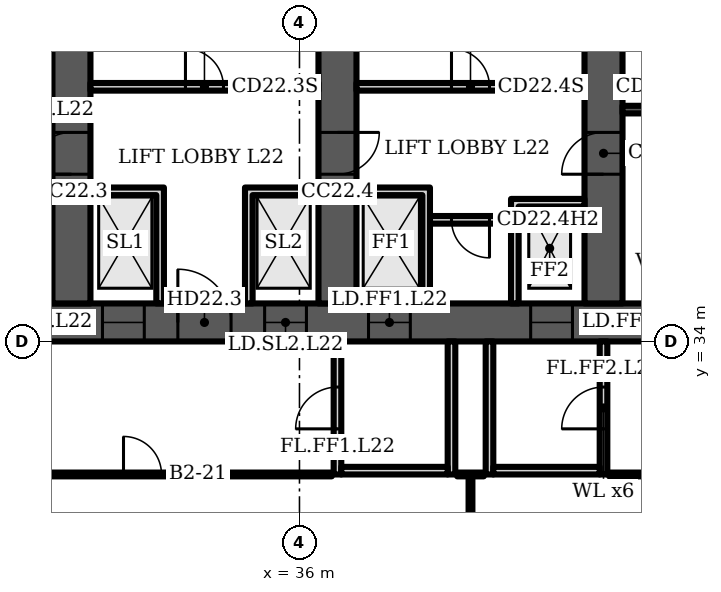
"""IFC4 building model, lengths in metres.
Left out: names, types, materials, properties, quantities, classifications, styles, units other than length and angle.
Written with IfcOpenShell. Run it as: python <this file> out.ifc"""

import sys

from ifc_helpers import new_model, si_unit, direction, frame, frame_2d, origin, place, context, subcontext, project, spatial, polyline, rectangle, outline, extrude, element, fill, save


model = new_model("IFC4")
c1 = context("Model", 3, precision=1e-05, world=origin(), true_north=direction((0.0, 1.0)))
c2 = subcontext(c1, "Body", "Model", "MODEL_VIEW")
j1 = project(units=[si_unit("LENGTHUNIT", "METRE"), si_unit("PLANEANGLEUNIT", "RADIAN")], contexts=[c1])
p1 = place(None, origin())
s1 = spatial("IfcSite", under=j1, at=p1, CompositionType="ELEMENT")
p2 = place(p1, origin())
s2 = spatial("IfcBuilding", under=s1, at=p2, CompositionType="ELEMENT")
p3 = place(p2, frame((0.0, 0.0, 100.3)))
s3 = spatial("IfcBuildingStorey", under=s2, at=p3, CompositionType="ELEMENT", Elevation=100.3)
p4 = place(p3, frame((16.0, 34.5, 0.0), z_axis=(0.0, 0.0, 1.0), x_axis=(1.0, 0.0, 0.0)))
e1 = element("IfcWall", 1, at=p4, inside=s3, PredefinedType="SHEAR", context=c2, shape_type="SweptSolid", body=[
    extrude(rectangle(XDim=49.0, YDim=1.0, at=frame_2d((24.5, 0.0))), origin(), (0.0, 0.0, 1.0), 3.6),
])
p5 = place(p4, frame((1.2, 0.0, 0.0)))
e2 = element("IfcOpeningElement", 2, at=p5, cuts=e1, PredefinedType="OPENING", context=c2, shape_type="SweptSolid", body=[
    extrude(rectangle(XDim=1.1, YDim=2.1, at=frame_2d((0.55, 1.05))), frame((0.0, 0.51, 0.0), z_axis=(0.0, -1.0, 0.0), x_axis=(1.0, 0.0, 0.0)), (0.0, 0.0, 1.0), 1.02),
])
p6 = place(p4, frame((5.083, 0.0, 0.0)))
e3 = element("IfcOpeningElement", 3, at=p6, cuts=e1, PredefinedType="OPENING", context=c2, shape_type="SweptSolid", body=[
    extrude(rectangle(XDim=1.1, YDim=2.1, at=frame_2d((0.55, 1.05))), frame((0.0, 0.51, 0.0), z_axis=(0.0, -1.0, 0.0), x_axis=(1.0, 0.0, 0.0)), (0.0, 0.0, 1.0), 1.02),
])
p7 = place(p4, frame((2.933, 0.0, 0.0)))
e4 = element("IfcOpeningElement", 4, at=p7, cuts=e1, PredefinedType="OPENING", context=c2, shape_type="SweptSolid", body=[
    extrude(rectangle(XDim=1.4, YDim=2.1, at=frame_2d((0.7, 1.05))), frame((0.0, 0.51, 0.0), z_axis=(0.0, -1.0, 0.0), x_axis=(1.0, 0.0, 0.0)), (0.0, 0.0, 1.0), 1.02),
])
p8 = place(p4, frame((7.65, 0.0, 0.0)))
e5 = element("IfcOpeningElement", 5, at=p8, cuts=e1, PredefinedType="OPENING", context=c2, shape_type="SweptSolid", body=[
    extrude(rectangle(XDim=1.2, YDim=2.1, at=frame_2d((0.6, 1.05))), frame((0.0, 0.51, 0.0), z_axis=(0.0, -1.0, 0.0), x_axis=(1.0, 0.0, 0.0)), (0.0, 0.0, 1.0), 1.02),
])
p9 = place(p4, frame((14.817, 0.0, 0.0)))
e6 = element("IfcOpeningElement", 6, at=p9, cuts=e1, PredefinedType="OPENING", context=c2, shape_type="SweptSolid", body=[
    extrude(rectangle(XDim=1.1, YDim=2.1, at=frame_2d((0.55, 1.05))), frame((0.0, 0.51, 0.0), z_axis=(0.0, -1.0, 0.0), x_axis=(1.0, 0.0, 0.0)), (0.0, 0.0, 1.0), 1.02),
])
p10 = place(p4, frame((19.083, 0.0, 0.0)))
e7 = element("IfcOpeningElement", 7, at=p10, cuts=e1, PredefinedType="OPENING", context=c2, shape_type="SweptSolid", body=[
    extrude(rectangle(XDim=1.1, YDim=2.1, at=frame_2d((0.55, 1.05))), frame((0.0, 0.51, 0.0), z_axis=(0.0, -1.0, 0.0), x_axis=(1.0, 0.0, 0.0)), (0.0, 0.0, 1.0), 1.02),
])
p11 = place(p4, frame((16.8, 0.0, 0.0)))
e8 = element("IfcOpeningElement", 8, at=p11, cuts=e1, PredefinedType="OPENING", context=c2, shape_type="SweptSolid", body=[
    extrude(rectangle(XDim=1.4, YDim=2.1, at=frame_2d((0.7, 1.05))), frame((0.0, 0.51, 0.0), z_axis=(0.0, -1.0, 0.0), x_axis=(1.0, 0.0, 0.0)), (0.0, 0.0, 1.0), 1.02),
])
p12 = place(p4, frame((21.817, 0.0, 0.0)))
e9 = element("IfcOpeningElement", 9, at=p12, cuts=e1, PredefinedType="OPENING", context=c2, shape_type="SweptSolid", body=[
    extrude(rectangle(XDim=1.1, YDim=2.1, at=frame_2d((0.55, 1.05))), frame((0.0, 0.51, 0.0), z_axis=(0.0, -1.0, 0.0), x_axis=(1.0, 0.0, 0.0)), (0.0, 0.0, 1.0), 1.02),
])
p13 = place(p4, frame((26.083, 0.0, 0.0)))
e10 = element("IfcOpeningElement", 10, at=p13, cuts=e1, PredefinedType="OPENING", context=c2, shape_type="SweptSolid", body=[
    extrude(rectangle(XDim=1.1, YDim=2.1, at=frame_2d((0.55, 1.05))), frame((0.0, 0.51, 0.0), z_axis=(0.0, -1.0, 0.0), x_axis=(1.0, 0.0, 0.0)), (0.0, 0.0, 1.0), 1.02),
])
p14 = place(p4, frame((33.15, 0.0, 0.0)))
e11 = element("IfcOpeningElement", 11, at=p14, cuts=e1, PredefinedType="OPENING", context=c2, shape_type="SweptSolid", body=[
    extrude(rectangle(XDim=1.2, YDim=2.1, at=frame_2d((0.6, 1.05))), frame((0.0, 0.51, 0.0), z_axis=(0.0, -1.0, 0.0), x_axis=(1.0, 0.0, 0.0)), (0.0, 0.0, 1.0), 1.02),
])
p15 = place(p4, frame((37.8, 0.0, 0.0)))
e12 = element("IfcOpeningElement", 12, at=p15, cuts=e1, PredefinedType="OPENING", context=c2, shape_type="SweptSolid", body=[
    extrude(rectangle(XDim=1.4, YDim=2.1, at=frame_2d((0.7, 1.05))), frame((0.0, 0.51, 0.0), z_axis=(0.0, -1.0, 0.0), x_axis=(1.0, 0.0, 0.0)), (0.0, 0.0, 1.0), 1.02),
])
p16 = place(p4, frame((42.817, 0.0, 0.0)))
e13 = element("IfcOpeningElement", 13, at=p16, cuts=e1, PredefinedType="OPENING", context=c2, shape_type="SweptSolid", body=[
    extrude(rectangle(XDim=1.1, YDim=2.1, at=frame_2d((0.55, 1.05))), frame((0.0, 0.51, 0.0), z_axis=(0.0, -1.0, 0.0), x_axis=(1.0, 0.0, 0.0)), (0.0, 0.0, 1.0), 1.02),
])
p17 = place(p4, frame((46.7, 0.0, 0.0)))
e14 = element("IfcOpeningElement", 14, at=p17, cuts=e1, PredefinedType="OPENING", context=c2, shape_type="SweptSolid", body=[
    extrude(rectangle(XDim=1.1, YDim=2.1, at=frame_2d((0.55, 1.05))), frame((0.0, 0.51, 0.0), z_axis=(0.0, -1.0, 0.0), x_axis=(1.0, 0.0, 0.0)), (0.0, 0.0, 1.0), 1.02),
])
p18 = place(p4, frame((44.667, 0.0, 0.0)))
e15 = element("IfcOpeningElement", 15, at=p18, cuts=e1, PredefinedType="OPENING", context=c2, shape_type="SweptSolid", body=[
    extrude(rectangle(XDim=1.4, YDim=2.1, at=frame_2d((0.7, 1.05))), frame((0.0, 0.51, 0.0), z_axis=(0.0, -1.0, 0.0), x_axis=(1.0, 0.0, 0.0)), (0.0, 0.0, 1.0), 1.02),
])
p19 = place(p3, frame((30.0, 35.0, 0.0), z_axis=(0.0, 0.0, 1.0), x_axis=(0.0, 1.0, 0.0)))
e16 = element("IfcWall", 16, at=p19, inside=s3, PredefinedType="SHEAR", context=c2, shape_type="SweptSolid", body=[
    extrude(rectangle(XDim=13.965, YDim=1.0, at=frame_2d((6.982, 0.0))), origin(), (0.0, 0.0, 1.0), 3.6),
])
p20 = place(p19, frame((3.4, 0.0, 0.0)))
e17 = element("IfcOpeningElement", 17, at=p20, cuts=e16, PredefinedType="OPENING", context=c2, shape_type="SweptSolid", body=[
    extrude(rectangle(XDim=1.1, YDim=2.1, at=frame_2d((0.55, 1.05))), frame((0.0, 0.51, 0.0), z_axis=(0.0, -1.0, 0.0), x_axis=(1.0, 0.0, 0.0)), (0.0, 0.0, 1.0), 1.02),
])
p21 = place(p3, frame((37.0, 35.0, 0.0), z_axis=(0.0, 0.0, 1.0), x_axis=(0.0, 1.0, 0.0)))
e18 = element("IfcWall", 18, at=p21, inside=s3, PredefinedType="SHEAR", context=c2, shape_type="SweptSolid", body=[
    extrude(rectangle(XDim=14.577, YDim=1.0, at=frame_2d((7.289, 0.0))), origin(), (0.0, 0.0, 1.0), 3.6),
])
p22 = place(p21, frame((3.4, 0.0, 0.0)))
e19 = element("IfcOpeningElement", 19, at=p22, cuts=e18, PredefinedType="OPENING", context=c2, shape_type="SweptSolid", body=[
    extrude(rectangle(XDim=1.1, YDim=2.1, at=frame_2d((0.55, 1.05))), frame((0.0, 0.51, 0.0), z_axis=(0.0, -1.0, 0.0), x_axis=(1.0, 0.0, 0.0)), (0.0, 0.0, 1.0), 1.02),
])
p23 = place(p21, frame((9.8, 0.0, 0.0)))
e20 = element("IfcOpeningElement", 20, at=p23, cuts=e18, PredefinedType="OPENING", context=c2, shape_type="SweptSolid", body=[
    extrude(rectangle(XDim=1.0, YDim=2.1, at=frame_2d((0.5, 1.05))), frame((0.0, 0.51, 0.0), z_axis=(0.0, -1.0, 0.0), x_axis=(1.0, 0.0, 0.0)), (0.0, 0.0, 1.0), 1.02),
])
p24 = place(p3, frame((44.0, 35.0, 0.0), z_axis=(0.0, 0.0, 1.0), x_axis=(0.0, 1.0, 0.0)))
e21 = element("IfcWall", 21, at=p24, inside=s3, PredefinedType="SHEAR", context=c2, shape_type="SweptSolid", body=[
    extrude(rectangle(XDim=14.577, YDim=1.0, at=frame_2d((7.289, 0.0))), origin(), (0.0, 0.0, 1.0), 3.6),
])
p25 = place(p24, frame((3.4, 0.0, 0.0)))
e22 = element("IfcOpeningElement", 22, at=p25, cuts=e21, PredefinedType="OPENING", context=c2, shape_type="SweptSolid", body=[
    extrude(rectangle(XDim=1.1, YDim=2.1, at=frame_2d((0.55, 1.05))), frame((0.0, 0.51, 0.0), z_axis=(0.0, -1.0, 0.0), x_axis=(1.0, 0.0, 0.0)), (0.0, 0.0, 1.0), 1.02),
])
p26 = place(p24, frame((9.8, 0.0, 0.0)))
e23 = element("IfcOpeningElement", 23, at=p26, cuts=e21, PredefinedType="OPENING", context=c2, shape_type="SweptSolid", body=[
    extrude(rectangle(XDim=1.0, YDim=2.1, at=frame_2d((0.5, 1.05))), frame((0.0, 0.51, 0.0), z_axis=(0.0, -1.0, 0.0), x_axis=(1.0, 0.0, 0.0)), (0.0, 0.0, 1.0), 1.02),
])
p27 = place(p3, frame((30.5, 40.7, 0.0), z_axis=(0.0, 0.0, 1.0), x_axis=(1.0, 0.0, 0.0)))
e24 = element("IfcWall", 24, at=p27, inside=s3, PredefinedType="PARTITIONING", context=c2, shape_type="SweptSolid", body=[
    extrude(rectangle(XDim=6.0, YDim=0.2, at=frame_2d((3.0, 0.0))), origin(), (0.0, 0.0, 1.0), 3.2),
])
p28 = place(p27, frame((2.5, 0.0, 0.0)))
e25 = element("IfcOpeningElement", 25, at=p28, cuts=e24, PredefinedType="OPENING", context=c2, shape_type="SweptSolid", body=[
    extrude(rectangle(XDim=1.0, YDim=2.1, at=frame_2d((0.5, 1.05))), frame((0.0, 0.11, 0.0), z_axis=(0.0, -1.0, 0.0), x_axis=(1.0, 0.0, 0.0)), (0.0, 0.0, 1.0), 0.22),
])
p29 = place(p3, frame((0.0, 0.0, -0.0)))
e26 = element("IfcWall", 26, at=p29, inside=s3, PredefinedType="PARTITIONING", context=c2, shape_type="SweptSolid", body=[
    extrude(outline(polyline([(32.233, 37.85), (30.5, 37.85), (30.5, 38.05), (32.233, 38.05), (32.433, 38.05), (32.433, 35.0), (32.233, 35.0), (32.233, 37.85)])), origin(), (0.0, 0.0, 1.0), 3.2),
])
p30 = place(p3, frame((0.0, 0.0, -0.0)))
e27 = element("IfcWall", 27, at=p30, inside=s3, PredefinedType="PARTITIONING", context=c2, shape_type="SweptSolid", body=[
    extrude(outline(polyline([(34.567, 38.05), (34.767, 38.05), (36.5, 38.05), (36.5, 37.85), (34.767, 37.85), (34.767, 35.0), (34.567, 35.0), (34.567, 38.05)])), origin(), (0.0, 0.0, 1.0), 3.2),
])
p31 = place(p3, frame((39.433, 37.2, 0.0), z_axis=(0.0, 0.0, 1.0), x_axis=(1.0, 0.0, 0.0)))
e28 = element("IfcWall", 28, at=p31, inside=s3, PredefinedType="PARTITIONING", context=c2, shape_type="SweptSolid", body=[
    extrude(rectangle(XDim=2.133, YDim=0.2, at=frame_2d((1.067, 0.0))), origin(), (0.0, 0.0, 1.0), 3.2),
])
p32 = place(p31, frame((0.567, 0.0, 0.0)))
e29 = element("IfcOpeningElement", 29, at=p32, cuts=e28, PredefinedType="OPENING", context=c2, shape_type="SweptSolid", body=[
    extrude(rectangle(XDim=1.0, YDim=2.1, at=frame_2d((0.5, 1.05))), frame((0.0, 0.11, 0.0), z_axis=(0.0, -1.0, 0.0), x_axis=(1.0, 0.0, 0.0)), (0.0, 0.0, 1.0), 0.22),
])
p33 = place(p3, frame((37.5, 40.7, 0.0), z_axis=(0.0, 0.0, 1.0), x_axis=(1.0, 0.0, 0.0)))
e30 = element("IfcWall", 30, at=p33, inside=s3, PredefinedType="PARTITIONING", context=c2, shape_type="SweptSolid", body=[
    extrude(rectangle(XDim=6.0, YDim=0.2, at=frame_2d((3.0, 0.0))), origin(), (0.0, 0.0, 1.0), 3.2),
])
p34 = place(p33, frame((2.5, 0.0, 0.0)))
e31 = element("IfcOpeningElement", 31, at=p34, cuts=e30, PredefinedType="OPENING", context=c2, shape_type="SweptSolid", body=[
    extrude(rectangle(XDim=1.0, YDim=2.1, at=frame_2d((0.5, 1.05))), frame((0.0, 0.11, 0.0), z_axis=(0.0, -1.0, 0.0), x_axis=(1.0, 0.0, 0.0)), (0.0, 0.0, 1.0), 0.22),
])
p35 = place(p3, frame((0.0, 0.0, -0.0)))
e32 = element("IfcWall", 32, at=p35, inside=s3, PredefinedType="PARTITIONING", context=c2, shape_type="SweptSolid", body=[
    extrude(outline(polyline([(41.567, 37.75), (41.767, 37.75), (43.5, 37.75), (43.5, 37.55), (41.767, 37.55), (41.767, 35.0), (41.567, 35.0), (41.567, 37.75)])), origin(), (0.0, 0.0, 1.0), 3.2),
])
p36 = place(p3, frame((0.0, 0.0, -0.0)))
e33 = element("IfcWall", 33, at=p36, inside=s3, PredefinedType="PARTITIONING", context=c2, shape_type="SweptSolid", body=[
    extrude(outline(polyline([(39.233, 37.85), (37.5, 37.85), (37.5, 38.05), (39.233, 38.05), (39.433, 38.05), (39.433, 35.0), (39.233, 35.0), (39.233, 37.85)])), origin(), (0.0, 0.0, 1.0), 3.2),
])
p37 = place(p3, frame((44.5, 40.1, 0.0), z_axis=(0.0, 0.0, 1.0), x_axis=(1.0, 0.0, 0.0)))
e34 = element("IfcWall", 34, at=p37, inside=s3, PredefinedType="SHEAR", context=c2, shape_type="SweptSolid", body=[
    extrude(rectangle(XDim=6.0, YDim=0.2, at=frame_2d((3.0, 0.0))), origin(), (0.0, 0.0, 1.0), 3.2),
])
p38 = place(p37, frame((3.425, 0.0, 0.0)))
e35 = element("IfcOpeningElement", 35, at=p38, cuts=e34, PredefinedType="OPENING", context=c2, shape_type="SweptSolid", body=[
    extrude(rectangle(XDim=1.2, YDim=2.1, at=frame_2d((0.6, 1.05))), frame((0.0, 0.11, 0.0), z_axis=(0.0, -1.0, 0.0), x_axis=(1.0, 0.0, 0.0)), (0.0, 0.0, 1.0), 0.22),
])
p39 = place(p37, frame((0.525, 0.0, 0.0)))
e36 = element("IfcOpeningElement", 36, at=p39, cuts=e34, PredefinedType="OPENING", context=c2, shape_type="SweptSolid", body=[
    extrude(rectangle(XDim=0.9, YDim=2.1, at=frame_2d((0.45, 1.05))), frame((0.0, 0.11, 0.0), z_axis=(0.0, -1.0, 0.0), x_axis=(1.0, 0.0, 0.0)), (0.0, 0.0, 1.0), 0.22),
])
p40 = place(p3, frame((37.0, 30.5, 0.0), z_axis=(0.0, 0.0, 1.0), x_axis=(0.0, 1.0, 0.0)))
e37 = element("IfcWall", 37, at=p40, inside=s3, PredefinedType="PARTITIONING", context=c2, shape_type="SweptSolid", body=[
    extrude(rectangle(XDim=3.5, YDim=0.2, at=frame_2d((1.75, 0.0))), origin(), (0.0, 0.0, 1.0), 3.2),
])
p41 = place(p40, frame((1.2, 0.0, 0.0)))
e38 = element("IfcOpeningElement", 38, at=p41, cuts=e37, PredefinedType="OPENING", context=c2, shape_type="SweptSolid", body=[
    extrude(rectangle(XDim=1.1, YDim=2.1, at=frame_2d((0.55, 1.05))), frame((0.0, 0.11, 0.0), z_axis=(0.0, -1.0, 0.0), x_axis=(1.0, 0.0, 0.0)), (0.0, 0.0, 1.0), 0.22),
])
p42 = place(p3, frame((40.0, 30.5, 0.0), z_axis=(0.0, 0.0, 1.0), x_axis=(0.0, 1.0, 0.0)))
e39 = element("IfcWall", 39, at=p42, inside=s3, PredefinedType="PARTITIONING", context=c2, shape_type="SweptSolid", body=[
    extrude(rectangle(XDim=3.5, YDim=0.2, at=frame_2d((1.75, 0.0))), origin(), (0.0, 0.0, 1.0), 3.2),
])
p43 = place(p3, frame((37.1, 30.6, 0.0), z_axis=(0.0, 0.0, 1.0), x_axis=(1.0, 0.0, 0.0)))
e40 = element("IfcWall", 40, at=p43, inside=s3, PredefinedType="PARTITIONING", context=c2, shape_type="SweptSolid", body=[
    extrude(rectangle(XDim=2.8, YDim=0.2, at=frame_2d((1.4, 0.0))), origin(), (0.0, 0.0, 1.0), 3.2),
])
p44 = place(p3, frame((41.0, 30.5, 0.0), z_axis=(0.0, 0.0, 1.0), x_axis=(0.0, 1.0, 0.0)))
e41 = element("IfcWall", 41, at=p44, inside=s3, PredefinedType="PARTITIONING", context=c2, shape_type="SweptSolid", body=[
    extrude(rectangle(XDim=3.5, YDim=0.2, at=frame_2d((1.75, 0.0))), origin(), (0.0, 0.0, 1.0), 3.2),
])
p45 = place(p3, frame((44.0, 30.5, 0.0), z_axis=(0.0, 0.0, 1.0), x_axis=(0.0, 1.0, 0.0)))
e42 = element("IfcWall", 42, at=p45, inside=s3, PredefinedType="PARTITIONING", context=c2, shape_type="SweptSolid", body=[
    extrude(rectangle(XDim=3.5, YDim=0.2, at=frame_2d((1.75, 0.0))), origin(), (0.0, 0.0, 1.0), 3.2),
])
p46 = place(p45, frame((1.2, 0.0, 0.0)))
e43 = element("IfcOpeningElement", 43, at=p46, cuts=e42, PredefinedType="OPENING", context=c2, shape_type="SweptSolid", body=[
    extrude(rectangle(XDim=1.1, YDim=2.1, at=frame_2d((0.55, 1.05))), frame((0.0, 0.11, 0.0), z_axis=(0.0, -1.0, 0.0), x_axis=(1.0, 0.0, 0.0)), (0.0, 0.0, 1.0), 0.22),
])
p47 = place(p3, frame((41.1, 30.6, 0.0), z_axis=(0.0, 0.0, 1.0), x_axis=(1.0, 0.0, 0.0)))
e44 = element("IfcWall", 44, at=p47, inside=s3, PredefinedType="PARTITIONING", context=c2, shape_type="SweptSolid", body=[
    extrude(rectangle(XDim=2.8, YDim=0.2, at=frame_2d((1.4, 0.0))), origin(), (0.0, 0.0, 1.0), 3.2),
])
p48 = place(p3, frame((16.0, 30.5, 0.0), z_axis=(0.0, 0.0, 1.0), x_axis=(1.0, 0.0, 0.0)))
e45 = element("IfcWall", 45, at=p48, inside=s3, PredefinedType="PARTITIONING", context=c2, shape_type="SweptSolid", body=[
    extrude(rectangle(XDim=20.85, YDim=0.1, at=frame_2d((10.425, 0.0))), origin(), (0.0, 0.0, 1.0), 3.2),
])
p49 = place(p48, frame((6.895, 0.0, 0.0)))
e46 = element("IfcOpeningElement", 46, at=p49, cuts=e45, PredefinedType="OPENING", context=c2, shape_type="SweptSolid", body=[
    extrude(rectangle(XDim=1.0, YDim=2.1, at=frame_2d((0.5, 1.05))), frame((0.0, 0.06, 0.0), z_axis=(0.0, -1.0, 0.0), x_axis=(1.0, 0.0, 0.0)), (0.0, 0.0, 1.0), 0.12),
])
p50 = place(p48, frame((15.37, 0.0, 0.0)))
e47 = element("IfcOpeningElement", 47, at=p50, cuts=e45, PredefinedType="OPENING", context=c2, shape_type="SweptSolid", body=[
    extrude(rectangle(XDim=1.0, YDim=2.1, at=frame_2d((0.5, 1.05))), frame((0.0, 0.06, 0.0), z_axis=(0.0, -1.0, 0.0), x_axis=(1.0, 0.0, 0.0)), (0.0, 0.0, 1.0), 0.12),
])
p51 = place(p3, frame((40.5, 27.3, 0.0), z_axis=(0.0, 0.0, 1.0), x_axis=(0.0, 1.0, 0.0)))
e48 = element("IfcWall", 48, at=p51, inside=s3, PredefinedType="PARTITIONING", context=c2, shape_type="SweptSolid", body=[
    extrude(rectangle(XDim=3.2, YDim=0.1, at=frame_2d((1.6, 0.0))), origin(), (0.0, 0.0, 1.0), 3.2),
])
p52 = place(p3, frame((40.15, 30.5, 0.0), z_axis=(0.0, 0.0, 1.0), x_axis=(1.0, 0.0, 0.0)))
e49 = element("IfcWall", 49, at=p52, inside=s3, PredefinedType="PARTITIONING", context=c2, shape_type="SweptSolid", body=[
    extrude(rectangle(XDim=0.7, YDim=0.1, at=frame_2d((0.35, 0.0))), origin(), (0.0, 0.0, 1.0), 3.2),
])
p53 = place(p3, frame((44.15, 30.5, 0.0), z_axis=(0.0, 0.0, 1.0), x_axis=(1.0, 0.0, 0.0)))
e50 = element("IfcWall", 50, at=p53, inside=s3, PredefinedType="PARTITIONING", context=c2, shape_type="SweptSolid", body=[
    extrude(rectangle(XDim=19.45, YDim=0.1, at=frame_2d((9.725, 0.0))), origin(), (0.0, 0.0, 1.0), 3.2),
])
p54 = place(p9, origin())
e51 = element("IfcDoor", 51, at=p54, inside=s3, OperationType="DOUBLE_DOOR_SLIDING", PredefinedType="DOOR", context=c2, shape_type="SweptSolid", body=[
    extrude(rectangle(XDim=1.1, YDim=2.1, at=frame_2d((0.55, 1.05))), frame((0.0, 0.025, 0.0), z_axis=(0.0, -1.0, 0.0), x_axis=(1.0, 0.0, 0.0)), (0.0, 0.0, 1.0), 0.05),
])
fill(e6, e51)
p55 = place(p10, origin())
e52 = element("IfcDoor", 52, at=p55, inside=s3, OperationType="DOUBLE_DOOR_SLIDING", PredefinedType="DOOR", context=c2, shape_type="SweptSolid", body=[
    extrude(rectangle(XDim=1.1, YDim=2.1, at=frame_2d((0.55, 1.05))), frame((0.0, 0.025, 0.0), z_axis=(0.0, -1.0, 0.0), x_axis=(1.0, 0.0, 0.0)), (0.0, 0.0, 1.0), 0.05),
])
fill(e7, e52)
p56 = place(p11, origin())
e53 = element("IfcDoor", 53, at=p56, inside=s3, OperationType="DOUBLE_DOOR_SINGLE_SWING", PredefinedType="DOOR", context=c2, shape_type="SweptSolid", body=[
    extrude(rectangle(XDim=1.4, YDim=2.1, at=frame_2d((0.7, 1.05))), frame((0.0, 0.025, 0.0), z_axis=(0.0, -1.0, 0.0), x_axis=(1.0, 0.0, 0.0)), (0.0, 0.0, 1.0), 0.05),
])
fill(e8, e53)
p57 = place(p28, origin())
e54 = element("IfcDoor", 54, at=p57, inside=s3, OperationType="SINGLE_SWING_LEFT", PredefinedType="DOOR", context=c2, shape_type="SweptSolid", body=[
    extrude(rectangle(XDim=1.0, YDim=2.1, at=frame_2d((0.5, 1.05))), frame((0.0, 0.025, 0.0), z_axis=(0.0, -1.0, 0.0), x_axis=(1.0, 0.0, 0.0)), (0.0, 0.0, 1.0), 0.05),
])
fill(e25, e54)
p58 = place(p32, origin())
e55 = element("IfcDoor", 55, at=p58, inside=s3, OperationType="SINGLE_SWING_RIGHT", PredefinedType="DOOR", context=c2, shape_type="SweptSolid", body=[
    extrude(rectangle(XDim=1.0, YDim=2.1, at=frame_2d((0.5, 1.05))), frame((0.0, 0.025, 0.0), z_axis=(0.0, -1.0, 0.0), x_axis=(1.0, 0.0, 0.0)), (0.0, 0.0, 1.0), 0.05),
])
fill(e29, e55)
p59 = place(p12, origin())
e56 = element("IfcDoor", 56, at=p59, inside=s3, OperationType="DOUBLE_DOOR_SLIDING", PredefinedType="DOOR", context=c2, shape_type="SweptSolid", body=[
    extrude(rectangle(XDim=1.1, YDim=2.1, at=frame_2d((0.55, 1.05))), frame((0.0, 0.025, 0.0), z_axis=(0.0, -1.0, 0.0), x_axis=(1.0, 0.0, 0.0)), (0.0, 0.0, 1.0), 0.05),
])
fill(e9, e56)
p60 = place(p13, origin())
e57 = element("IfcDoor", 57, at=p60, inside=s3, OperationType="DOUBLE_DOOR_SLIDING", PredefinedType="DOOR", context=c2, shape_type="SweptSolid", body=[
    extrude(rectangle(XDim=1.1, YDim=2.1, at=frame_2d((0.55, 1.05))), frame((0.0, 0.025, 0.0), z_axis=(0.0, -1.0, 0.0), x_axis=(1.0, 0.0, 0.0)), (0.0, 0.0, 1.0), 0.05),
])
fill(e10, e57)
p61 = place(p34, origin())
e58 = element("IfcDoor", 58, at=p61, inside=s3, OperationType="SINGLE_SWING_LEFT", PredefinedType="DOOR", context=c2, shape_type="SweptSolid", body=[
    extrude(rectangle(XDim=1.0, YDim=2.1, at=frame_2d((0.5, 1.05))), frame((0.0, 0.025, 0.0), z_axis=(0.0, -1.0, 0.0), x_axis=(1.0, 0.0, 0.0)), (0.0, 0.0, 1.0), 0.05),
])
fill(e31, e58)
p62 = place(p20, origin())
e59 = element("IfcDoor", 59, at=p62, inside=s3, OperationType="SINGLE_SWING_LEFT", PredefinedType="DOOR", context=c2, shape_type="SweptSolid", body=[
    extrude(rectangle(XDim=1.1, YDim=2.1, at=frame_2d((0.55, 1.05))), frame((0.0, 0.025, 0.0), z_axis=(0.0, -1.0, 0.0), x_axis=(1.0, 0.0, 0.0)), (0.0, 0.0, 1.0), 0.05),
])
fill(e17, e59)
p63 = place(p22, origin())
e60 = element("IfcDoor", 60, at=p63, inside=s3, OperationType="SINGLE_SWING_RIGHT", PredefinedType="DOOR", context=c2, shape_type="SweptSolid", body=[
    extrude(rectangle(XDim=1.1, YDim=2.1, at=frame_2d((0.55, 1.05))), frame((0.0, 0.025, 0.0), z_axis=(0.0, -1.0, 0.0), x_axis=(1.0, 0.0, 0.0)), (0.0, 0.0, 1.0), 0.05),
])
fill(e19, e60)
p64 = place(p25, origin())
e61 = element("IfcDoor", 61, at=p64, inside=s3, OperationType="SINGLE_SWING_LEFT", PredefinedType="DOOR", context=c2, shape_type="SweptSolid", body=[
    extrude(rectangle(XDim=1.1, YDim=2.1, at=frame_2d((0.55, 1.05))), frame((0.0, 0.025, 0.0), z_axis=(0.0, -1.0, 0.0), x_axis=(1.0, 0.0, 0.0)), (0.0, 0.0, 1.0), 0.05),
])
fill(e22, e61)
p65 = place(p41, origin())
e62 = element("IfcDoor", 62, at=p65, inside=s3, OperationType="SINGLE_SWING_LEFT", PredefinedType="DOOR", context=c2, shape_type="SweptSolid", body=[
    extrude(rectangle(XDim=1.1, YDim=2.1, at=frame_2d((0.55, 1.05))), frame((0.0, 0.025, 0.0), z_axis=(0.0, -1.0, 0.0), x_axis=(1.0, 0.0, 0.0)), (0.0, 0.0, 1.0), 0.05),
])
fill(e38, e62)
p66 = place(p46, origin())
e63 = element("IfcDoor", 63, at=p66, inside=s3, OperationType="SINGLE_SWING_LEFT", PredefinedType="DOOR", context=c2, shape_type="SweptSolid", body=[
    extrude(rectangle(XDim=1.1, YDim=2.1, at=frame_2d((0.55, 1.05))), frame((0.0, 0.025, 0.0), z_axis=(0.0, -1.0, 0.0), x_axis=(1.0, 0.0, 0.0)), (0.0, 0.0, 1.0), 0.05),
])
fill(e43, e63)
p67 = place(p50, origin())
e64 = element("IfcDoor", 64, at=p67, inside=s3, OperationType="SINGLE_SWING_LEFT", PredefinedType="DOOR", context=c2, shape_type="SweptSolid", body=[
    extrude(rectangle(XDim=1.0, YDim=2.1, at=frame_2d((0.5, 1.05))), frame((0.0, 0.025, 0.0), z_axis=(0.0, -1.0, 0.0), x_axis=(1.0, 0.0, 0.0)), (0.0, 0.0, 1.0), 0.05),
])
fill(e47, e64)
save(model, sys.argv[1])
